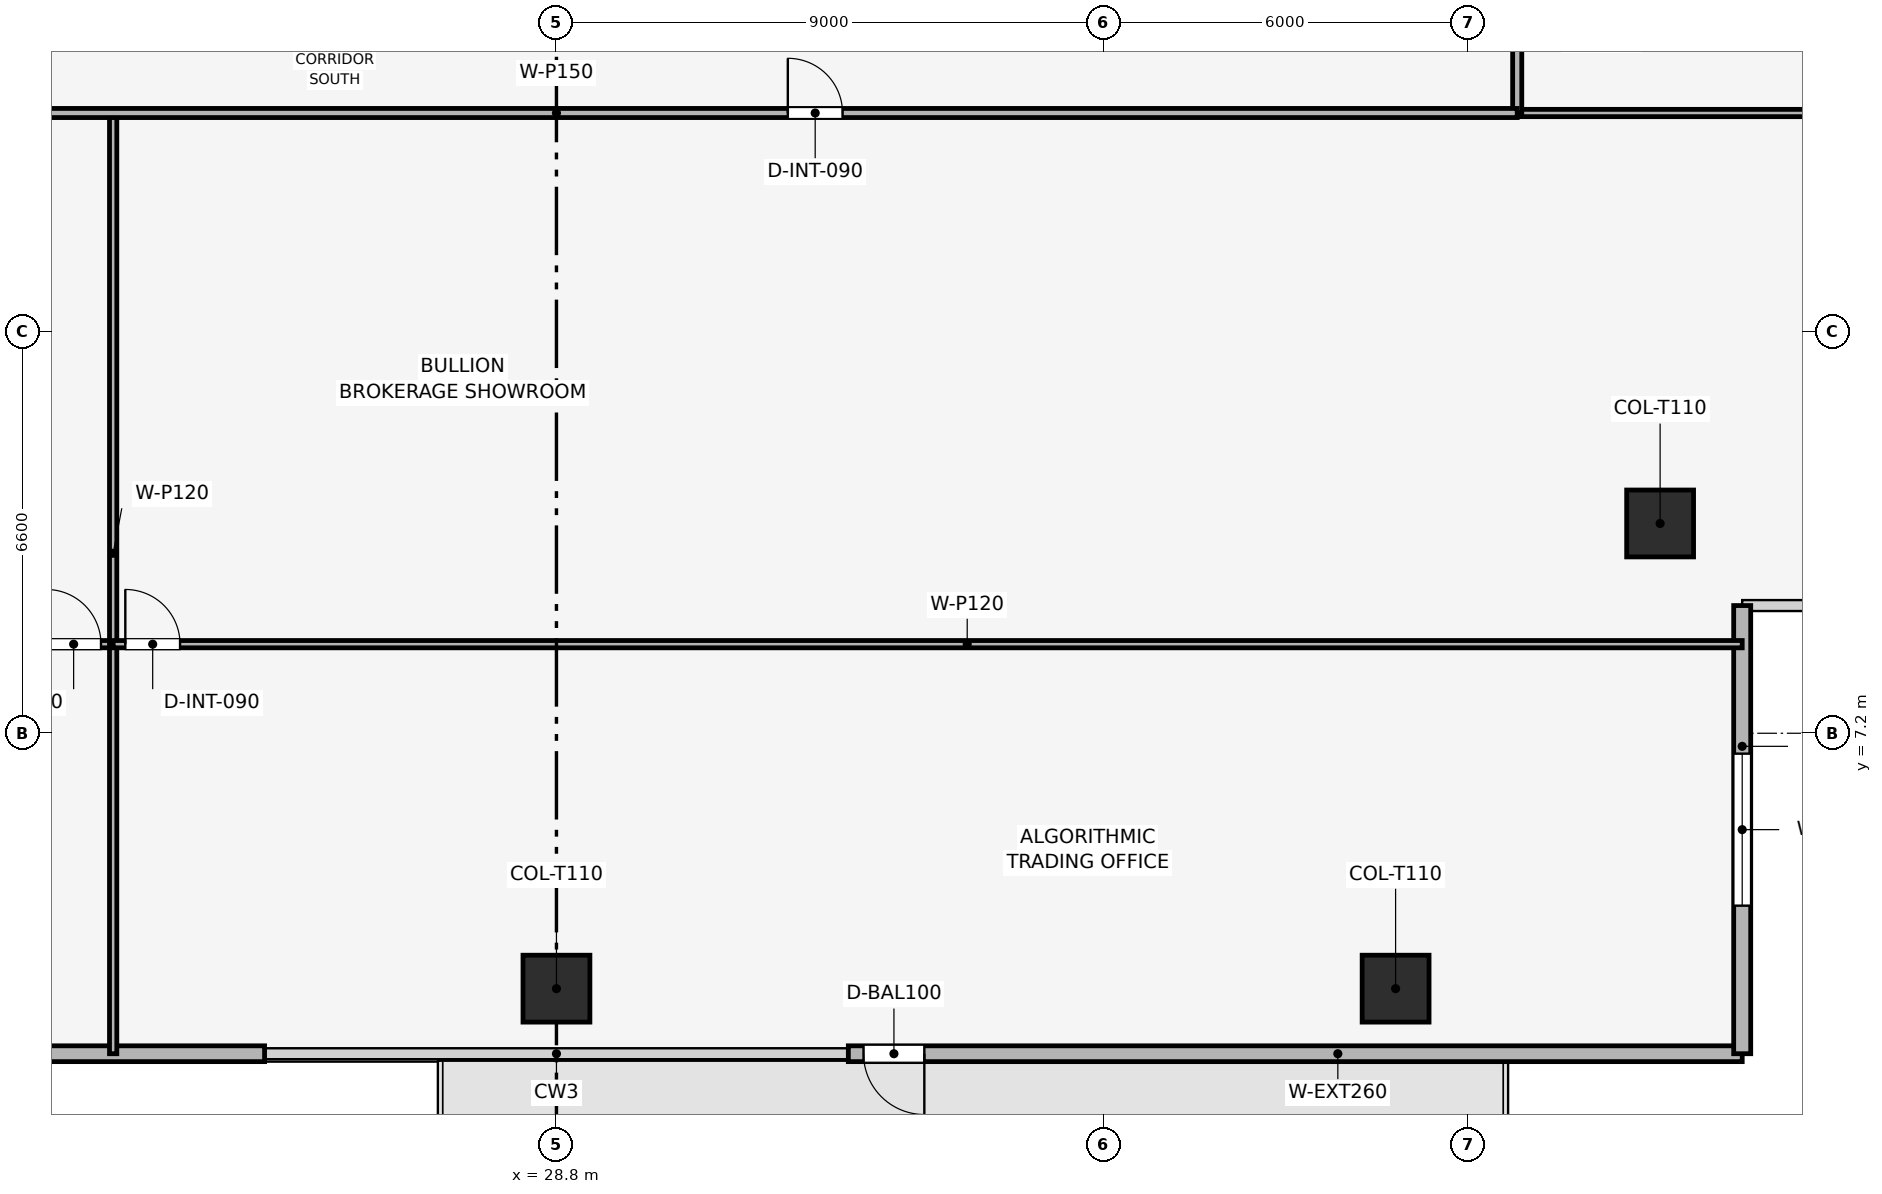
"""IFC4 building model, lengths in metres.
Left out: names, types, materials, properties, quantities, classifications, styles, units other than length and angle.
Written with IfcOpenShell. Run it as: python <this file> out.ifc"""

import sys

from ifc_helpers import new_model, si_unit, direction, frame, frame_2d, origin, origin_2d, place, context, subcontext, project, spatial, rectangle, extrude, element, fill, save


model = new_model("IFC4")
c1 = context("Model", 3, precision=1e-05, world=origin(), true_north=direction((0.0, 1.0)))
c2 = subcontext(c1, "Body", "Model", "MODEL_VIEW")
j1 = project(units=[si_unit("LENGTHUNIT", "METRE"), si_unit("PLANEANGLEUNIT", "RADIAN")], contexts=[c1])
p1 = place(None, origin())
s1 = spatial("IfcSite", under=j1, at=p1, CompositionType="ELEMENT")
p2 = place(p1, origin())
s2 = spatial("IfcBuilding", under=s1, at=p2, CompositionType="ELEMENT")
p3 = place(p2, frame((0.0, 0.0, 199.95)))
s3 = spatial("IfcBuildingStorey", under=s2, at=p3, CompositionType="ELEMENT", Elevation=199.95)
for number, where, z_axis, x_axis in (
    (1, (28.8, 3.0, 0.003), (0.0, 0.0, 1.0), (1.0, 0.0, 0.0)),
    (2, (42.6, 3.0, 0.003), (0.0, 0.0, 1.0), (1.0, 0.0, 0.0)),
    (3, (46.95, 10.65, 0.003), (0.0, 0.0, 1.0), (1.0, 0.0, 0.0)),
):
    element("IfcColumn", number, at=place(p3, frame(where, z_axis=z_axis, x_axis=x_axis)), inside=s3, PredefinedType="COLUMN", context=c2, shape_type="SweptSolid", body=[
        extrude(rectangle(XDim=1.1, YDim=1.1, at=origin_2d()), origin(), (0.0, 0.0, 1.0), 3.494),
    ])
p4 = place(p3, frame((48.3, 1.93, 0.0), z_axis=(0.0, 0.0, 1.0), x_axis=(-1.0, 0.0, 0.0)))
e4 = element("IfcWall", 4, at=p4, inside=s3, PredefinedType="SOLIDWALL", context=c2, shape_type="SweptSolid", body=[
    extrude(rectangle(XDim=14.7, YDim=0.26, at=frame_2d((7.35, 0.0))), origin(), (0.0, 0.0, 1.0), 3.5),
])
p5 = place(p4, frame((13.45, 0.0, 0.0)))
e5 = element("IfcOpeningElement", 5, at=p5, cuts=e4, PredefinedType="OPENING", context=c2, shape_type="SweptSolid", body=[
    extrude(rectangle(XDim=1.0, YDim=2.2, at=frame_2d((0.5, 1.1))), frame((0.0, 0.14, 0.0), z_axis=(0.0, -1.0, 0.0), x_axis=(1.0, 0.0, 0.0)), (0.0, 0.0, 1.0), 0.28),
])
p6 = place(p3, frame((24.0, 1.93, 0.0), z_axis=(0.0, 0.0, 1.0), x_axis=(-1.0, 0.0, 0.0)))
e6 = element("IfcWall", 6, at=p6, inside=s3, PredefinedType="SOLIDWALL", context=c2, shape_type="SweptSolid", body=[
    extrude(rectangle(XDim=14.7, YDim=0.26, at=frame_2d((7.35, 0.0))), origin(), (0.0, 0.0, 1.0), 3.5),
])
p7 = place(p6, frame((10.65, 0.0, 0.9)))
e7 = element("IfcOpeningElement", 7, at=p7, cuts=e6, PredefinedType="OPENING", context=c2, shape_type="SweptSolid", body=[
    extrude(rectangle(XDim=3.8, YDim=1.9, at=frame_2d((1.9, 0.95))), frame((0.0, 0.14, 0.0), z_axis=(0.0, -1.0, 0.0), x_axis=(1.0, 0.0, 0.0)), (0.0, 0.0, 1.0), 0.28),
])
p8 = place(p3, frame((48.3, 9.3, 0.0), z_axis=(0.0, 0.0, 1.0), x_axis=(0.0, -1.0, 0.0)))
e8 = element("IfcWall", 8, at=p8, inside=s3, PredefinedType="SOLIDWALL", context=c2, shape_type="SweptSolid", body=[
    extrude(rectangle(XDim=7.37, YDim=0.28, at=frame_2d((3.685, 0.0))), origin(), (0.0, 0.0, 1.0), 3.5),
])
p9 = place(p8, frame((2.435, 0.0, 0.9)))
e9 = element("IfcOpeningElement", 9, at=p9, cuts=e8, PredefinedType="OPENING", context=c2, shape_type="SweptSolid", body=[
    extrude(rectangle(XDim=2.5, YDim=1.9, at=frame_2d((1.25, 0.95))), frame((0.0, 0.15, 0.0), z_axis=(0.0, -1.0, 0.0), x_axis=(1.0, 0.0, 0.0)), (0.0, 0.0, 1.0), 0.3),
])
p10 = place(p3, frame((9.3, 8.665, 0.0), z_axis=(0.0, 0.0, 1.0), x_axis=(1.0, 0.0, 0.0)))
e10 = element("IfcWall", 10, at=p10, inside=s3, PredefinedType="PARTITIONING", context=c2, shape_type="SweptSolid", body=[
    extrude(rectangle(XDim=12.21, YDim=0.12, at=frame_2d((6.105, 0.0))), origin(), (0.0, 0.0, 1.0), 2.885),
])
p11 = place(p10, frame((11.11, 0.0, 0.0)))
e11 = element("IfcOpeningElement", 11, at=p11, cuts=e10, PredefinedType="OPENING", context=c2, shape_type="SweptSolid", body=[
    extrude(rectangle(XDim=0.9, YDim=2.1, at=frame_2d((0.45, 1.05))), frame((0.0, 0.07, 0.0), z_axis=(0.0, -1.0, 0.0), x_axis=(1.0, 0.0, 0.0)), (0.0, 0.0, 1.0), 0.14),
])
p12 = place(p3, frame((21.51, 1.93, 0.0), z_axis=(0.0, 0.0, 1.0), x_axis=(0.0, 1.0, 0.0)))
e12 = element("IfcWall", 12, at=p12, inside=s3, PredefinedType="PARTITIONING", context=c2, shape_type="SweptSolid", body=[
    extrude(rectangle(XDim=15.47, YDim=0.12, at=frame_2d((7.735, 0.0))), origin(), (0.0, 0.0, 1.0), 2.885),
])
p13 = place(p3, frame((21.51, 8.665, 0.0), z_axis=(0.0, 0.0, 1.0), x_axis=(1.0, 0.0, 0.0)))
e13 = element("IfcWall", 13, at=p13, inside=s3, PredefinedType="PARTITIONING", context=c2, shape_type="SweptSolid", body=[
    extrude(rectangle(XDim=26.79, YDim=0.12, at=frame_2d((13.395, 0.0))), origin(), (0.0, 0.0, 1.0), 2.885),
])
p14 = place(p13, frame((0.2, 0.0, 0.0)))
e14 = element("IfcOpeningElement", 14, at=p14, cuts=e13, PredefinedType="OPENING", context=c2, shape_type="SweptSolid", body=[
    extrude(rectangle(XDim=0.9, YDim=2.1, at=frame_2d((0.45, 1.05))), frame((0.0, 0.07, 0.0), z_axis=(0.0, -1.0, 0.0), x_axis=(1.0, 0.0, 0.0)), (0.0, 0.0, 1.0), 0.14),
])
p15 = place(p3, frame((44.6, 17.4, 0.0), z_axis=(0.0, 0.0, 1.0), x_axis=(1.0, 0.0, 0.0)))
e15 = element("IfcWall", 15, at=p15, inside=s3, PredefinedType="PARTITIONING", context=c2, shape_type="SweptSolid", body=[
    extrude(rectangle(XDim=11.07, YDim=0.12, at=frame_2d((5.535, 0.0))), origin(), (0.0, 0.0, 1.0), 2.885),
])
p16 = place(p3, frame((44.6, 17.4, 0.0), z_axis=(0.0, 0.0, 1.0), x_axis=(0.0, 1.0, 0.0)))
e16 = element("IfcWall", 16, at=p16, inside=s3, PredefinedType="PARTITIONING", context=c2, shape_type="SweptSolid", body=[
    extrude(rectangle(XDim=2.4, YDim=0.15, at=frame_2d((1.2, 0.0))), origin(), (0.0, 0.0, 1.0), 3.5),
])
p17 = place(p3, frame((13.0, 17.4, 0.0), z_axis=(0.0, 0.0, 1.0), x_axis=(1.0, 0.0, 0.0)))
e17 = element("IfcWall", 17, at=p17, inside=s3, PredefinedType="PARTITIONING", context=c2, shape_type="SweptSolid", body=[
    extrude(rectangle(XDim=31.6, YDim=0.15, at=frame_2d((15.8, 0.0))), origin(), (0.0, 0.0, 1.0), 3.035),
])
p18 = place(p17, frame((3.805, 0.0, 0.0)))
e18 = element("IfcOpeningElement", 18, at=p18, cuts=e17, PredefinedType="OPENING", context=c2, shape_type="SweptSolid", body=[
    extrude(rectangle(XDim=0.9, YDim=2.1, at=frame_2d((0.45, 1.05))), frame((0.0, 0.085, 0.0), z_axis=(0.0, -1.0, 0.0), x_axis=(1.0, 0.0, 0.0)), (0.0, 0.0, 1.0), 0.17),
])
p19 = place(p17, frame((19.605, 0.0, 0.0)))
e19 = element("IfcOpeningElement", 19, at=p19, cuts=e17, PredefinedType="OPENING", context=c2, shape_type="SweptSolid", body=[
    extrude(rectangle(XDim=0.9, YDim=2.1, at=frame_2d((0.45, 1.05))), frame((0.0, 0.085, 0.0), z_axis=(0.0, -1.0, 0.0), x_axis=(1.0, 0.0, 0.0)), (0.0, 0.0, 1.0), 0.17),
])
p20 = place(p5, origin())
e20 = element("IfcDoor", 20, at=p20, inside=s3, OperationType="SINGLE_SWING_LEFT", PredefinedType="DOOR", context=c2, shape_type="SweptSolid", body=[
    extrude(rectangle(XDim=1.0, YDim=2.2, at=frame_2d((0.5, 1.1))), frame((0.0, 0.025, 0.0), z_axis=(0.0, -1.0, 0.0), x_axis=(1.0, 0.0, 0.0)), (0.0, 0.0, 1.0), 0.05),
])
fill(e5, e20)
p21 = place(p9, origin())
e21 = element("IfcWindow", 21, at=p21, inside=s3, PartitioningType="SINGLE_PANEL", PredefinedType="WINDOW", context=c2, shape_type="SweptSolid", body=[
    extrude(rectangle(XDim=2.5, YDim=1.9, at=frame_2d((1.25, 0.95))), frame((0.0, 0.03, 0.0), z_axis=(0.0, -1.0, 0.0), x_axis=(1.0, 0.0, 0.0)), (0.0, 0.0, 1.0), 0.06),
])
fill(e9, e21)
p22 = place(p11, origin())
e22 = element("IfcDoor", 22, at=p22, inside=s3, OperationType="SINGLE_SWING_LEFT", PredefinedType="DOOR", context=c2, shape_type="SweptSolid", body=[
    extrude(rectangle(XDim=0.9, YDim=2.1, at=frame_2d((0.45, 1.05))), frame((0.0, 0.025, 0.0), z_axis=(0.0, -1.0, 0.0), x_axis=(1.0, 0.0, 0.0)), (0.0, 0.0, 1.0), 0.05),
])
fill(e11, e22)
p23 = place(p14, origin())
e23 = element("IfcDoor", 23, at=p23, inside=s3, OperationType="SINGLE_SWING_LEFT", PredefinedType="DOOR", context=c2, shape_type="SweptSolid", body=[
    extrude(rectangle(XDim=0.9, YDim=2.1, at=frame_2d((0.45, 1.05))), frame((0.0, 0.025, 0.0), z_axis=(0.0, -1.0, 0.0), x_axis=(1.0, 0.0, 0.0)), (0.0, 0.0, 1.0), 0.05),
])
fill(e14, e23)
p24 = place(p19, origin())
e24 = element("IfcDoor", 24, at=p24, inside=s3, OperationType="SINGLE_SWING_LEFT", PredefinedType="DOOR", context=c2, shape_type="SweptSolid", body=[
    extrude(rectangle(XDim=0.9, YDim=2.1, at=frame_2d((0.45, 1.05))), frame((0.0, 0.025, 0.0), z_axis=(0.0, -1.0, 0.0), x_axis=(1.0, 0.0, 0.0)), (0.0, 0.0, 1.0), 0.05),
])
fill(e19, e24)
save(model, sys.argv[1])
